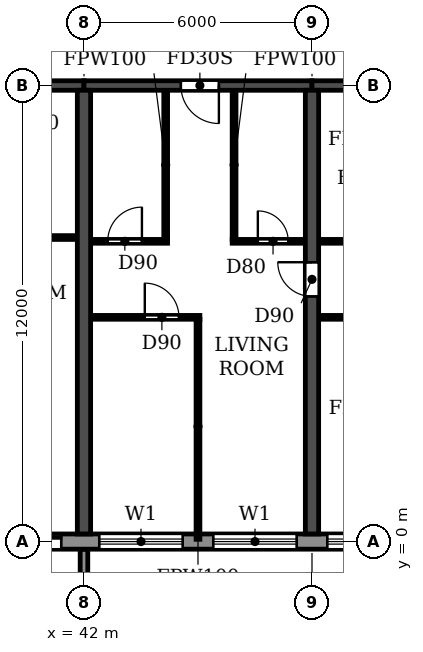
"""IFC4 building model, lengths in metres.
Left out: names, types, materials, properties, quantities, classifications, styles, units other than length and angle.
Written with IfcOpenShell. Run it as: python <this file> out.ifc"""

import sys

from ifc_helpers import new_model, si_unit, direction, frame, frame_2d, origin, place, context, subcontext, project, spatial, polyline, rectangle, outline, extrude, source, transform, mapped, element, fill, save


model = new_model("IFC4")
c1 = context("Model", 3, precision=1e-05, world=origin(), true_north=direction((0.0, 1.0)))
c2 = subcontext(c1, "Body", "Model", "MODEL_VIEW")
j1 = project(units=[si_unit("LENGTHUNIT", "METRE"), si_unit("PLANEANGLEUNIT", "RADIAN")], contexts=[c1])
p1 = place(None, origin())
s1 = spatial("IfcSite", under=j1, at=p1, CompositionType="ELEMENT")
p2 = place(p1, origin())
s2 = spatial("IfcBuilding", under=s1, at=p2, CompositionType="ELEMENT")
p3 = place(p2, frame((0.0, 0.0, 102.6)))
s3 = spatial("IfcBuildingStorey", under=s2, at=p3, CompositionType="ELEMENT", Elevation=102.6)
p4 = place(p3, frame((42.0, 0.2, 0.0), z_axis=(0.0, 0.0, 1.0), x_axis=(0.0, 1.0, 0.0)))
e1 = element("IfcWall", 1, at=p4, inside=s3, PredefinedType="SHEAR", context=c2, shape_type="SweptSolid", body=[
    extrude(rectangle(XDim=11.675, YDim=0.35, at=frame_2d((5.837, 0.0))), origin(), (0.0, 0.0, 1.0), 3.0),
])
p5 = place(p3, frame((48.0, 0.2, 0.0), z_axis=(0.0, 0.0, 1.0), x_axis=(0.0, 1.0, 0.0)))
e2 = element("IfcWall", 2, at=p5, inside=s3, PredefinedType="SHEAR", context=c2, shape_type="SweptSolid", body=[
    extrude(rectangle(XDim=11.675, YDim=0.35, at=frame_2d((5.837, 0.0))), origin(), (0.0, 0.0, 1.0), 3.0),
])
p6 = place(p5, frame((6.25, 0.0, 0.0)))
e3 = element("IfcOpeningElement", 3, at=p6, cuts=e2, PredefinedType="OPENING", context=c2, shape_type="SweptSolid", body=[
    extrude(rectangle(XDim=0.9, YDim=2.1, at=frame_2d((0.45, 1.05))), frame((0.0, 0.185, 0.0), z_axis=(0.0, -1.0, 0.0), x_axis=(1.0, 0.0, 0.0)), (0.0, 0.0, 1.0), 0.37),
])
p7 = place(p3, frame((36.0, 12.0, 0.0), z_axis=(0.0, 0.0, 1.0), x_axis=(1.0, 0.0, 0.0)))
e4 = element("IfcWall", 4, at=p7, inside=s3, PredefinedType="SHEAR", context=c2, shape_type="SweptSolid", body=[
    extrude(rectangle(XDim=6.0, YDim=0.25, at=frame_2d((3.0, 0.0))), origin(), (0.0, 0.0, 1.0), 2.4),
])
p8 = place(p7, frame((2.45, 0.0, 0.0)))
e5 = element("IfcOpeningElement", 5, at=p8, cuts=e4, PredefinedType="OPENING", context=c2, shape_type="SweptSolid", body=[
    extrude(rectangle(XDim=1.0, YDim=2.1, at=frame_2d((0.5, 1.05))), frame((0.0, 0.135, 0.0), z_axis=(0.0, -1.0, 0.0), x_axis=(1.0, 0.0, 0.0)), (0.0, 0.0, 1.0), 0.27),
])
p9 = place(p3, frame((42.0, 12.0, 0.0), z_axis=(0.0, 0.0, 1.0), x_axis=(1.0, 0.0, 0.0)))
e6 = element("IfcWall", 6, at=p9, inside=s3, PredefinedType="SHEAR", context=c2, shape_type="SweptSolid", body=[
    extrude(rectangle(XDim=6.0, YDim=0.25, at=frame_2d((3.0, 0.0))), origin(), (0.0, 0.0, 1.0), 2.4),
])
p10 = place(p9, frame((2.55, 0.0, 0.0)))
e7 = element("IfcOpeningElement", 7, at=p10, cuts=e6, PredefinedType="OPENING", context=c2, shape_type="SweptSolid", body=[
    extrude(rectangle(XDim=1.0, YDim=2.1, at=frame_2d((0.5, 1.05))), frame((0.0, 0.135, 0.0), z_axis=(0.0, -1.0, 0.0), x_axis=(1.0, 0.0, 0.0)), (0.0, 0.0, 1.0), 0.27),
])
p11 = place(p3, frame((48.0, 12.0, 0.0), z_axis=(0.0, 0.0, 1.0), x_axis=(1.0, 0.0, 0.0)))
e8 = element("IfcWall", 8, at=p11, inside=s3, PredefinedType="SHEAR", context=c2, shape_type="SweptSolid", body=[
    extrude(rectangle(XDim=6.0, YDim=0.25, at=frame_2d((3.0, 0.0))), origin(), (0.0, 0.0, 1.0), 2.4),
])
p12 = place(p3, frame((10.683, 0.0, 0.0), z_axis=(0.0, 0.0, 1.0), x_axis=(1.0, 0.0, 0.0)))
e9 = element("IfcWall", 9, at=p12, inside=s3, PredefinedType="STANDARD", context=c2, shape_type="SweptSolid", body=[
    extrude(rectangle(XDim=80.634, YDim=0.4, at=frame_2d((40.317, 0.0))), origin(), (0.0, 0.0, 1.0), 3.0),
])
p13 = place(p12, frame((1.717, 0.0, 0.9)))
e10 = element("IfcOpeningElement", 10, at=p13, cuts=e9, PredefinedType="OPENING", context=c2, shape_type="SweptSolid", body=[
    extrude(rectangle(XDim=2.2, YDim=1.5, at=frame_2d((1.1, 0.75))), frame((0.0, 0.21, 0.0), z_axis=(0.0, -1.0, 0.0), x_axis=(1.0, 0.0, 0.0)), (0.0, 0.0, 1.0), 0.42),
])
p14 = place(p12, frame((4.917, 0.0, 0.0)))
e11 = element("IfcOpeningElement", 11, at=p14, cuts=e9, PredefinedType="OPENING", context=c2, shape_type="SweptSolid", body=[
    extrude(rectangle(XDim=1.8, YDim=2.4, at=frame_2d((0.9, 1.2))), frame((0.0, 0.21, 0.0), z_axis=(0.0, -1.0, 0.0), x_axis=(1.0, 0.0, 0.0)), (0.0, 0.0, 1.0), 0.42),
])
p15 = place(p12, frame((7.717, 0.0, 0.9)))
e12 = element("IfcOpeningElement", 12, at=p15, cuts=e9, PredefinedType="OPENING", context=c2, shape_type="SweptSolid", body=[
    extrude(rectangle(XDim=2.2, YDim=1.5, at=frame_2d((1.1, 0.75))), frame((0.0, 0.21, 0.0), z_axis=(0.0, -1.0, 0.0), x_axis=(1.0, 0.0, 0.0)), (0.0, 0.0, 1.0), 0.42),
])
p16 = place(p12, frame((10.717, 0.0, 0.9)))
e13 = element("IfcOpeningElement", 13, at=p16, cuts=e9, PredefinedType="OPENING", context=c2, shape_type="SweptSolid", body=[
    extrude(rectangle(XDim=2.2, YDim=1.5, at=frame_2d((1.1, 0.75))), frame((0.0, 0.21, 0.0), z_axis=(0.0, -1.0, 0.0), x_axis=(1.0, 0.0, 0.0)), (0.0, 0.0, 1.0), 0.42),
])
p17 = place(p12, frame((13.717, 0.0, 0.9)))
e14 = element("IfcOpeningElement", 14, at=p17, cuts=e9, PredefinedType="OPENING", context=c2, shape_type="SweptSolid", body=[
    extrude(rectangle(XDim=2.2, YDim=1.5, at=frame_2d((1.1, 0.75))), frame((0.0, 0.21, 0.0), z_axis=(0.0, -1.0, 0.0), x_axis=(1.0, 0.0, 0.0)), (0.0, 0.0, 1.0), 0.42),
])
p18 = place(p12, frame((16.717, 0.0, 0.9)))
e15 = element("IfcOpeningElement", 15, at=p18, cuts=e9, PredefinedType="OPENING", context=c2, shape_type="SweptSolid", body=[
    extrude(rectangle(XDim=2.2, YDim=1.5, at=frame_2d((1.1, 0.75))), frame((0.0, 0.21, 0.0), z_axis=(0.0, -1.0, 0.0), x_axis=(1.0, 0.0, 0.0)), (0.0, 0.0, 1.0), 0.42),
])
p19 = place(p12, frame((19.717, 0.0, 0.9)))
e16 = element("IfcOpeningElement", 16, at=p19, cuts=e9, PredefinedType="OPENING", context=c2, shape_type="SweptSolid", body=[
    extrude(rectangle(XDim=2.2, YDim=1.5, at=frame_2d((1.1, 0.75))), frame((0.0, 0.21, 0.0), z_axis=(0.0, -1.0, 0.0), x_axis=(1.0, 0.0, 0.0)), (0.0, 0.0, 1.0), 0.42),
])
p20 = place(p12, frame((22.717, 0.0, 0.9)))
e17 = element("IfcOpeningElement", 17, at=p20, cuts=e9, PredefinedType="OPENING", context=c2, shape_type="SweptSolid", body=[
    extrude(rectangle(XDim=2.2, YDim=1.5, at=frame_2d((1.1, 0.75))), frame((0.0, 0.21, 0.0), z_axis=(0.0, -1.0, 0.0), x_axis=(1.0, 0.0, 0.0)), (0.0, 0.0, 1.0), 0.42),
])
p21 = place(p12, frame((25.717, 0.0, 0.9)))
e18 = element("IfcOpeningElement", 18, at=p21, cuts=e9, PredefinedType="OPENING", context=c2, shape_type="SweptSolid", body=[
    extrude(rectangle(XDim=2.2, YDim=1.5, at=frame_2d((1.1, 0.75))), frame((0.0, 0.21, 0.0), z_axis=(0.0, -1.0, 0.0), x_axis=(1.0, 0.0, 0.0)), (0.0, 0.0, 1.0), 0.42),
])
p22 = place(p12, frame((28.917, 0.0, 0.0)))
e19 = element("IfcOpeningElement", 19, at=p22, cuts=e9, PredefinedType="OPENING", context=c2, shape_type="SweptSolid", body=[
    extrude(rectangle(XDim=1.8, YDim=2.4, at=frame_2d((0.9, 1.2))), frame((0.0, 0.21, 0.0), z_axis=(0.0, -1.0, 0.0), x_axis=(1.0, 0.0, 0.0)), (0.0, 0.0, 1.0), 0.42),
])
p23 = place(p12, frame((31.717, 0.0, 0.9)))
e20 = element("IfcOpeningElement", 20, at=p23, cuts=e9, PredefinedType="OPENING", context=c2, shape_type="SweptSolid", body=[
    extrude(rectangle(XDim=2.2, YDim=1.5, at=frame_2d((1.1, 0.75))), frame((0.0, 0.21, 0.0), z_axis=(0.0, -1.0, 0.0), x_axis=(1.0, 0.0, 0.0)), (0.0, 0.0, 1.0), 0.42),
])
p24 = place(p12, frame((34.717, 0.0, 0.9)))
e21 = element("IfcOpeningElement", 21, at=p24, cuts=e9, PredefinedType="OPENING", context=c2, shape_type="SweptSolid", body=[
    extrude(rectangle(XDim=2.2, YDim=1.5, at=frame_2d((1.1, 0.75))), frame((0.0, 0.21, 0.0), z_axis=(0.0, -1.0, 0.0), x_axis=(1.0, 0.0, 0.0)), (0.0, 0.0, 1.0), 0.42),
])
p25 = place(p12, frame((37.717, 0.0, 0.9)))
e22 = element("IfcOpeningElement", 22, at=p25, cuts=e9, PredefinedType="OPENING", context=c2, shape_type="SweptSolid", body=[
    extrude(rectangle(XDim=2.2, YDim=1.5, at=frame_2d((1.1, 0.75))), frame((0.0, 0.21, 0.0), z_axis=(0.0, -1.0, 0.0), x_axis=(1.0, 0.0, 0.0)), (0.0, 0.0, 1.0), 0.42),
])
p26 = place(p12, frame((40.717, 0.0, 0.9)))
e23 = element("IfcOpeningElement", 23, at=p26, cuts=e9, PredefinedType="OPENING", context=c2, shape_type="SweptSolid", body=[
    extrude(rectangle(XDim=2.2, YDim=1.5, at=frame_2d((1.1, 0.75))), frame((0.0, 0.21, 0.0), z_axis=(0.0, -1.0, 0.0), x_axis=(1.0, 0.0, 0.0)), (0.0, 0.0, 1.0), 0.42),
])
p27 = place(p12, frame((43.717, 0.0, 0.9)))
e24 = element("IfcOpeningElement", 24, at=p27, cuts=e9, PredefinedType="OPENING", context=c2, shape_type="SweptSolid", body=[
    extrude(rectangle(XDim=2.2, YDim=1.5, at=frame_2d((1.1, 0.75))), frame((0.0, 0.21, 0.0), z_axis=(0.0, -1.0, 0.0), x_axis=(1.0, 0.0, 0.0)), (0.0, 0.0, 1.0), 0.42),
])
p28 = place(p12, frame((46.717, 0.0, 0.9)))
e25 = element("IfcOpeningElement", 25, at=p28, cuts=e9, PredefinedType="OPENING", context=c2, shape_type="SweptSolid", body=[
    extrude(rectangle(XDim=2.2, YDim=1.5, at=frame_2d((1.1, 0.75))), frame((0.0, 0.21, 0.0), z_axis=(0.0, -1.0, 0.0), x_axis=(1.0, 0.0, 0.0)), (0.0, 0.0, 1.0), 0.42),
])
p29 = place(p12, frame((49.917, 0.0, 0.0)))
e26 = element("IfcOpeningElement", 26, at=p29, cuts=e9, PredefinedType="OPENING", context=c2, shape_type="SweptSolid", body=[
    extrude(rectangle(XDim=1.8, YDim=2.4, at=frame_2d((0.9, 1.2))), frame((0.0, 0.21, 0.0), z_axis=(0.0, -1.0, 0.0), x_axis=(1.0, 0.0, 0.0)), (0.0, 0.0, 1.0), 0.42),
])
p30 = place(p12, frame((52.717, 0.0, 0.9)))
e27 = element("IfcOpeningElement", 27, at=p30, cuts=e9, PredefinedType="OPENING", context=c2, shape_type="SweptSolid", body=[
    extrude(rectangle(XDim=2.2, YDim=1.5, at=frame_2d((1.1, 0.75))), frame((0.0, 0.21, 0.0), z_axis=(0.0, -1.0, 0.0), x_axis=(1.0, 0.0, 0.0)), (0.0, 0.0, 1.0), 0.42),
])
p31 = place(p12, frame((55.717, 0.0, 0.9)))
e28 = element("IfcOpeningElement", 28, at=p31, cuts=e9, PredefinedType="OPENING", context=c2, shape_type="SweptSolid", body=[
    extrude(rectangle(XDim=2.2, YDim=1.5, at=frame_2d((1.1, 0.75))), frame((0.0, 0.21, 0.0), z_axis=(0.0, -1.0, 0.0), x_axis=(1.0, 0.0, 0.0)), (0.0, 0.0, 1.0), 0.42),
])
p32 = place(p12, frame((58.717, 0.0, 0.9)))
e29 = element("IfcOpeningElement", 29, at=p32, cuts=e9, PredefinedType="OPENING", context=c2, shape_type="SweptSolid", body=[
    extrude(rectangle(XDim=2.2, YDim=1.5, at=frame_2d((1.1, 0.75))), frame((0.0, 0.21, 0.0), z_axis=(0.0, -1.0, 0.0), x_axis=(1.0, 0.0, 0.0)), (0.0, 0.0, 1.0), 0.42),
])
p33 = place(p12, frame((61.717, 0.0, 0.9)))
e30 = element("IfcOpeningElement", 30, at=p33, cuts=e9, PredefinedType="OPENING", context=c2, shape_type="SweptSolid", body=[
    extrude(rectangle(XDim=2.2, YDim=1.5, at=frame_2d((1.1, 0.75))), frame((0.0, 0.21, 0.0), z_axis=(0.0, -1.0, 0.0), x_axis=(1.0, 0.0, 0.0)), (0.0, 0.0, 1.0), 0.42),
])
p34 = place(p12, frame((64.717, 0.0, 0.9)))
e31 = element("IfcOpeningElement", 31, at=p34, cuts=e9, PredefinedType="OPENING", context=c2, shape_type="SweptSolid", body=[
    extrude(rectangle(XDim=2.2, YDim=1.5, at=frame_2d((1.1, 0.75))), frame((0.0, 0.21, 0.0), z_axis=(0.0, -1.0, 0.0), x_axis=(1.0, 0.0, 0.0)), (0.0, 0.0, 1.0), 0.42),
])
p35 = place(p12, frame((67.717, 0.0, 0.9)))
e32 = element("IfcOpeningElement", 32, at=p35, cuts=e9, PredefinedType="OPENING", context=c2, shape_type="SweptSolid", body=[
    extrude(rectangle(XDim=2.2, YDim=1.5, at=frame_2d((1.1, 0.75))), frame((0.0, 0.21, 0.0), z_axis=(0.0, -1.0, 0.0), x_axis=(1.0, 0.0, 0.0)), (0.0, 0.0, 1.0), 0.42),
])
p36 = place(p12, frame((70.717, 0.0, 0.9)))
e33 = element("IfcOpeningElement", 33, at=p36, cuts=e9, PredefinedType="OPENING", context=c2, shape_type="SweptSolid", body=[
    extrude(rectangle(XDim=2.2, YDim=1.5, at=frame_2d((1.1, 0.75))), frame((0.0, 0.21, 0.0), z_axis=(0.0, -1.0, 0.0), x_axis=(1.0, 0.0, 0.0)), (0.0, 0.0, 1.0), 0.42),
])
p37 = place(p12, frame((73.717, 0.0, 0.9)))
e34 = element("IfcOpeningElement", 34, at=p37, cuts=e9, PredefinedType="OPENING", context=c2, shape_type="SweptSolid", body=[
    extrude(rectangle(XDim=2.2, YDim=1.5, at=frame_2d((1.1, 0.75))), frame((0.0, 0.21, 0.0), z_axis=(0.0, -1.0, 0.0), x_axis=(1.0, 0.0, 0.0)), (0.0, 0.0, 1.0), 0.42),
])
p38 = place(p12, frame((76.917, 0.0, 0.0)))
e35 = element("IfcOpeningElement", 35, at=p38, cuts=e9, PredefinedType="OPENING", context=c2, shape_type="SweptSolid", body=[
    extrude(rectangle(XDim=1.8, YDim=2.4, at=frame_2d((0.9, 1.2))), frame((0.0, 0.21, 0.0), z_axis=(0.0, -1.0, 0.0), x_axis=(1.0, 0.0, 0.0)), (0.0, 0.0, 1.0), 0.42),
])
m1 = source(origin(), c2, "Body", "SweptSolid", [
    extrude(outline(polyline([(0.0, 0.0), (0.2, 0.0), (0.2, 1.65), (0.0, 1.65), (0.0, 0.0)])), origin(), (0.0, 0.0, 1.0), 3.1),
])
p39 = place(p3, frame((41.9, -1.85, 0.0)))
e36 = element("IfcWall", 36, at=p39, inside=s3, PredefinedType="STANDARD", context=c2, shape_type="MappedRepresentation", body=[
    mapped(m1, transform((0.0, 0.0, 0.0))),
])
p40 = place(p3, frame((42.185, 5.9, 0.0), z_axis=(0.0, 0.0, 1.0), x_axis=(1.0, 0.0, 0.0)))
e37 = element("IfcWall", 37, at=p40, inside=s3, PredefinedType="PARTITIONING", context=c2, shape_type="SweptSolid", body=[
    extrude(rectangle(XDim=2.865, YDim=0.1, at=frame_2d((1.433, 0.0))), origin(), (0.0, 0.0, 1.0), 3.0),
])
p41 = place(p40, frame((1.415, 0.0, 0.0)))
e38 = element("IfcOpeningElement", 38, at=p41, cuts=e37, PredefinedType="OPENING", context=c2, shape_type="SweptSolid", body=[
    extrude(rectangle(XDim=0.9, YDim=2.1, at=frame_2d((0.45, 1.05))), frame((0.0, 0.06, 0.0), z_axis=(0.0, -1.0, 0.0), x_axis=(1.0, 0.0, 0.0)), (0.0, 0.0, 1.0), 0.12),
])
p42 = place(p3, frame((48.185, 5.9, 0.0), z_axis=(0.0, 0.0, 1.0), x_axis=(1.0, 0.0, 0.0)))
e39 = element("IfcWall", 39, at=p42, inside=s3, PredefinedType="PARTITIONING", context=c2, shape_type="SweptSolid", body=[
    extrude(rectangle(XDim=5.63, YDim=0.1, at=frame_2d((2.815, 0.0))), origin(), (0.0, 0.0, 1.0), 3.0),
])
p43 = place(p42, frame((1.415, 0.0, 0.0)))
e40 = element("IfcOpeningElement", 40, at=p43, cuts=e39, PredefinedType="OPENING", context=c2, shape_type="SweptSolid", body=[
    extrude(rectangle(XDim=0.9, YDim=2.1, at=frame_2d((0.45, 1.05))), frame((0.0, 0.06, 0.0), z_axis=(0.0, -1.0, 0.0), x_axis=(1.0, 0.0, 0.0)), (0.0, 0.0, 1.0), 0.12),
])
p44 = place(p42, frame((3.315, 0.0, 0.0)))
e41 = element("IfcOpeningElement", 41, at=p44, cuts=e39, PredefinedType="OPENING", context=c2, shape_type="SweptSolid", body=[
    extrude(rectangle(XDim=0.9, YDim=2.1, at=frame_2d((0.45, 1.05))), frame((0.0, 0.06, 0.0), z_axis=(0.0, -1.0, 0.0), x_axis=(1.0, 0.0, 0.0)), (0.0, 0.0, 1.0), 0.12),
])
p45 = place(p3, frame((42.185, 7.9, 0.0), z_axis=(0.0, 0.0, 1.0), x_axis=(1.0, 0.0, 0.0)))
e42 = element("IfcWall", 42, at=p45, inside=s3, PredefinedType="PARTITIONING", context=c2, shape_type="SweptSolid", body=[
    extrude(rectangle(XDim=2.015, YDim=0.1, at=frame_2d((1.007, 0.0))), origin(), (0.0, 0.0, 1.0), 3.0),
])
p46 = place(p45, frame((0.44, 0.0, 0.0)))
e43 = element("IfcOpeningElement", 43, at=p46, cuts=e42, PredefinedType="OPENING", context=c2, shape_type="SweptSolid", body=[
    extrude(rectangle(XDim=0.9, YDim=2.1, at=frame_2d((0.45, 1.05))), frame((0.0, 0.06, 0.0), z_axis=(0.0, -1.0, 0.0), x_axis=(1.0, 0.0, 0.0)), (0.0, 0.0, 1.0), 0.12),
])
p47 = place(p3, frame((45.9, 7.9, 0.0), z_axis=(0.0, 0.0, 1.0), x_axis=(1.0, 0.0, 0.0)))
e44 = element("IfcWall", 44, at=p47, inside=s3, PredefinedType="PARTITIONING", context=c2, shape_type="SweptSolid", body=[
    extrude(rectangle(XDim=1.915, YDim=0.1, at=frame_2d((0.958, 0.0))), origin(), (0.0, 0.0, 1.0), 3.0),
])
p48 = place(p47, frame((0.675, 0.0, 0.0)))
e45 = element("IfcOpeningElement", 45, at=p48, cuts=e44, PredefinedType="OPENING", context=c2, shape_type="SweptSolid", body=[
    extrude(rectangle(XDim=0.8, YDim=2.1, at=frame_2d((0.4, 1.05))), frame((0.0, 0.06, 0.0), z_axis=(0.0, -1.0, 0.0), x_axis=(1.0, 0.0, 0.0)), (0.0, 0.0, 1.0), 0.12),
])
p49 = place(p3, frame((48.185, 7.9, 0.0), z_axis=(0.0, 0.0, 1.0), x_axis=(1.0, 0.0, 0.0)))
e46 = element("IfcWall", 46, at=p49, inside=s3, PredefinedType="PARTITIONING", context=c2, shape_type="SweptSolid", body=[
    extrude(rectangle(XDim=3.165, YDim=0.1, at=frame_2d((1.583, 0.0))), origin(), (0.0, 0.0, 1.0), 3.0),
])
p50 = place(p49, frame((1.065, 0.0, 0.0)))
e47 = element("IfcOpeningElement", 47, at=p50, cuts=e46, PredefinedType="OPENING", context=c2, shape_type="SweptSolid", body=[
    extrude(rectangle(XDim=0.8, YDim=2.1, at=frame_2d((0.4, 1.05))), frame((0.0, 0.06, 0.0), z_axis=(0.0, -1.0, 0.0), x_axis=(1.0, 0.0, 0.0)), (0.0, 0.0, 1.0), 0.12),
])
p51 = place(p3, frame((39.8, 8.0, 0.0), z_axis=(0.0, 0.0, 1.0), x_axis=(1.0, 0.0, 0.0)))
e48 = element("IfcWall", 48, at=p51, inside=s3, PredefinedType="PARTITIONING", context=c2, shape_type="SweptSolid", body=[
    extrude(rectangle(XDim=2.015, YDim=0.1, at=frame_2d((1.007, 0.0))), origin(), (0.0, 0.0, 1.0), 3.0),
])
p52 = place(p3, frame((44.15, 7.95, 0.0), z_axis=(0.0, 0.0, 1.0), x_axis=(0.0, 1.0, 0.0)))
e49 = element("IfcWall", 49, at=p52, inside=s3, PredefinedType="PARTITIONING", context=c2, shape_type="SweptSolid", body=[
    extrude(rectangle(XDim=3.915, YDim=0.1, at=frame_2d((1.958, 0.0))), origin(), (0.0, 0.0, 1.0), 3.0),
])
p53 = place(p3, frame((45.0, 0.06, 0.0), z_axis=(0.0, 0.0, 1.0), x_axis=(0.0, 1.0, 0.0)))
e50 = element("IfcWall", 50, at=p53, inside=s3, PredefinedType="PARTITIONING", context=c2, shape_type="SweptSolid", body=[
    extrude(rectangle(XDim=5.79, YDim=0.1, at=frame_2d((2.895, 0.0))), origin(), (0.0, 0.0, 1.0), 3.0),
])
p54 = place(p3, frame((45.95, 7.95, 0.0), z_axis=(0.0, 0.0, 1.0), x_axis=(0.0, 1.0, 0.0)))
e51 = element("IfcWall", 51, at=p54, inside=s3, PredefinedType="PARTITIONING", context=c2, shape_type="SweptSolid", body=[
    extrude(rectangle(XDim=3.915, YDim=0.1, at=frame_2d((1.958, 0.0))), origin(), (0.0, 0.0, 1.0), 3.0),
])
p55 = place(p22, origin())
e52 = element("IfcDoor", 52, at=p55, inside=s3, OperationType="DOUBLE_DOOR_SLIDING", PredefinedType="DOOR", context=c2, shape_type="SweptSolid", body=[
    extrude(rectangle(XDim=1.8, YDim=2.4, at=frame_2d((0.9, 1.2))), frame((0.0, 0.025, 0.0), z_axis=(0.0, -1.0, 0.0), x_axis=(1.0, 0.0, 0.0)), (0.0, 0.0, 1.0), 0.05),
])
fill(e19, e52)
p56 = place(p23, origin())
e53 = element("IfcWindow", 53, at=p56, inside=s3, PartitioningType="DOUBLE_PANEL_HORIZONTAL", PredefinedType="WINDOW", context=c2, shape_type="SweptSolid", body=[
    extrude(rectangle(XDim=2.2, YDim=1.5, at=frame_2d((1.1, 0.75))), frame((0.0, 0.03, 0.0), z_axis=(0.0, -1.0, 0.0), x_axis=(1.0, 0.0, 0.0)), (0.0, 0.0, 1.0), 0.06),
])
fill(e20, e53)
p57 = place(p24, origin())
e54 = element("IfcWindow", 54, at=p57, inside=s3, PartitioningType="DOUBLE_PANEL_HORIZONTAL", PredefinedType="WINDOW", context=c2, shape_type="SweptSolid", body=[
    extrude(rectangle(XDim=2.2, YDim=1.5, at=frame_2d((1.1, 0.75))), frame((0.0, 0.03, 0.0), z_axis=(0.0, -1.0, 0.0), x_axis=(1.0, 0.0, 0.0)), (0.0, 0.0, 1.0), 0.06),
])
fill(e21, e54)
p58 = place(p25, origin())
e55 = element("IfcWindow", 55, at=p58, inside=s3, PartitioningType="DOUBLE_PANEL_HORIZONTAL", PredefinedType="WINDOW", context=c2, shape_type="SweptSolid", body=[
    extrude(rectangle(XDim=2.2, YDim=1.5, at=frame_2d((1.1, 0.75))), frame((0.0, 0.03, 0.0), z_axis=(0.0, -1.0, 0.0), x_axis=(1.0, 0.0, 0.0)), (0.0, 0.0, 1.0), 0.06),
])
fill(e22, e55)
p59 = place(p46, origin())
e56 = element("IfcDoor", 56, at=p59, inside=s3, OperationType="SINGLE_SWING_RIGHT", PredefinedType="DOOR", context=c2, shape_type="SweptSolid", body=[
    extrude(rectangle(XDim=0.9, YDim=2.1, at=frame_2d((0.45, 1.05))), frame((0.0, 0.025, 0.0), z_axis=(0.0, -1.0, 0.0), x_axis=(1.0, 0.0, 0.0)), (0.0, 0.0, 1.0), 0.05),
])
fill(e43, e56)
p60 = place(p41, origin())
e57 = element("IfcDoor", 57, at=p60, inside=s3, OperationType="SINGLE_SWING_LEFT", PredefinedType="DOOR", context=c2, shape_type="SweptSolid", body=[
    extrude(rectangle(XDim=0.9, YDim=2.1, at=frame_2d((0.45, 1.05))), frame((0.0, 0.025, 0.0), z_axis=(0.0, -1.0, 0.0), x_axis=(1.0, 0.0, 0.0)), (0.0, 0.0, 1.0), 0.05),
])
fill(e38, e57)
p61 = place(p10, frame((1.0, 0.0, 0.0), z_axis=(0.0, 0.0, 1.0), x_axis=(-1.0, 0.0, 0.0)))
e58 = element("IfcDoor", 58, at=p61, inside=s3, OperationType="SINGLE_SWING_LEFT", PredefinedType="DOOR", context=c2, shape_type="SweptSolid", body=[
    extrude(rectangle(XDim=1.0, YDim=2.1, at=frame_2d((0.5, 1.05))), frame((0.0, 0.025, 0.0), z_axis=(0.0, -1.0, 0.0), x_axis=(1.0, 0.0, 0.0)), (0.0, 0.0, 1.0), 0.05),
])
fill(e7, e58)
p62 = place(p48, origin())
e59 = element("IfcDoor", 59, at=p62, inside=s3, OperationType="SINGLE_SWING_LEFT", PredefinedType="DOOR", context=c2, shape_type="SweptSolid", body=[
    extrude(rectangle(XDim=0.8, YDim=2.1, at=frame_2d((0.4, 1.05))), frame((0.0, 0.025, 0.0), z_axis=(0.0, -1.0, 0.0), x_axis=(1.0, 0.0, 0.0)), (0.0, 0.0, 1.0), 0.05),
])
fill(e45, e59)
p63 = place(p6, origin())
e60 = element("IfcDoor", 60, at=p63, inside=s3, OperationType="SINGLE_SWING_RIGHT", PredefinedType="DOOR", context=c2, shape_type="SweptSolid", body=[
    extrude(rectangle(XDim=0.9, YDim=2.1, at=frame_2d((0.45, 1.05))), frame((0.0, 0.025, 0.0), z_axis=(0.0, -1.0, 0.0), x_axis=(1.0, 0.0, 0.0)), (0.0, 0.0, 1.0), 0.05),
])
fill(e3, e60)
save(model, sys.argv[1])
